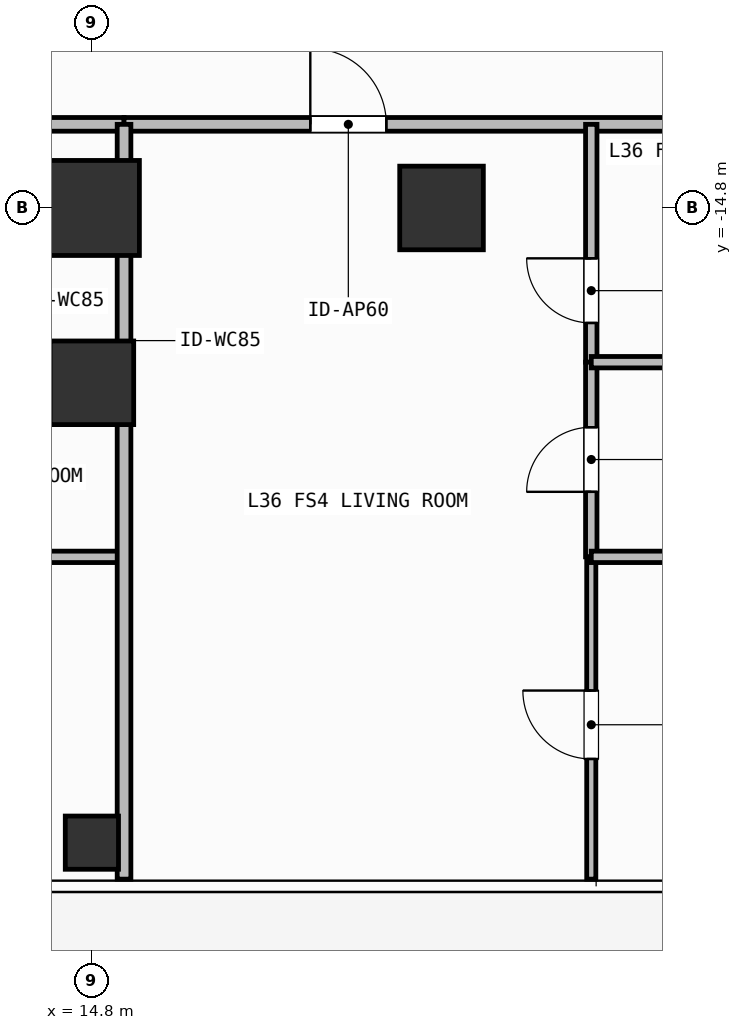
"""IFC4 building model, lengths in metres.
Left out: names, types, materials, properties, quantities, classifications, styles, units other than length and angle.
Written with IfcOpenShell. Run it as: python <this file> out.ifc"""

import sys

from ifc_helpers import new_model, si_unit, direction, frame, frame_2d, origin, origin_2d, place, context, subcontext, project, spatial, rectangle, hollow_rectangle, extrude, element, fill, save


model = new_model("IFC4")
c1 = context("Model", 3, precision=1e-05, world=origin(), true_north=direction((0.0, 1.0)))
c2 = subcontext(c1, "Body", "Model", "MODEL_VIEW")
j1 = project(units=[si_unit("LENGTHUNIT", "METRE"), si_unit("PLANEANGLEUNIT", "RADIAN")], contexts=[c1])
p1 = place(None, origin())
s1 = spatial("IfcSite", under=j1, at=p1, CompositionType="ELEMENT")
p2 = place(p1, origin())
s2 = spatial("IfcBuilding", under=s1, at=p2, CompositionType="ELEMENT")
p3 = place(p2, frame((0.0, 0.0, 144.6)))
s3 = spatial("IfcBuildingStorey", under=s2, at=p3, CompositionType="ELEMENT", Elevation=144.6)
p4 = place(p3, frame((14.8, -14.8, 0.0), z_axis=(0.0, 0.0, 1.0), x_axis=(1.0, 0.0, 0.0)))
e1 = element("IfcColumn", 1, at=p4, inside=s3, PredefinedType="COLUMN", context=c2, shape_type="SweptSolid", body=[
    extrude(rectangle(XDim=1.25, YDim=1.25, at=origin_2d()), origin(), (0.0, 0.0, 1.0), 3.9),
])
for number, where, z_axis, x_axis in (
    (2, (19.4, -14.8, 0.0), (0.0, 0.0, 1.0), (1.0, 0.0, 0.0)),
    (3, (14.8, -17.1, 0.0), (0.0, 0.0, 1.0), (1.0, 0.0, 0.0)),
):
    element("IfcColumn", number, at=place(p3, frame(where, z_axis=z_axis, x_axis=x_axis)), inside=s3, PredefinedType="COLUMN", context=c2, shape_type="SweptSolid", body=[
        extrude(rectangle(XDim=1.1, YDim=1.1, at=origin_2d()), origin(), (0.0, 0.0, 1.0), 3.9),
    ])
p5 = place(p3, frame((14.8, -23.15, 0.0), z_axis=(0.0, 0.0, 1.0), x_axis=(1.0, 0.0, 0.0)))
e4 = element("IfcColumn", 4, at=p5, inside=s3, PredefinedType="COLUMN", context=c2, shape_type="SweptSolid", body=[
    extrude(hollow_rectangle(XDim=0.7, YDim=0.7, WallThickness=0.032, at=origin_2d()), origin(), (0.0, 0.0, 1.0), 3.9),
])
p6 = place(p3, frame((3.9, -13.7, 0.0), z_axis=(0.0, 0.0, 1.0), x_axis=(1.0, 0.0, 0.0)))
e5 = element("IfcWall", 5, at=p6, inside=s3, PredefinedType="PARTITIONING", context=c2, shape_type="SweptSolid", body=[
    extrude(rectangle(XDim=11.323, YDim=0.18, at=frame_2d((5.662, 0.0))), origin(), (0.0, 0.0, 1.0), 3.68),
])
p7 = place(p6, frame((5.519, 0.0, 0.0)))
e6 = element("IfcOpeningElement", 6, at=p7, cuts=e5, PredefinedType="OPENING", context=c2, shape_type="SweptSolid", body=[
    extrude(rectangle(XDim=1.0, YDim=2.2, at=frame_2d((0.5, 1.1))), frame((0.0, 0.1, 0.0), z_axis=(0.0, -1.0, 0.0), x_axis=(1.0, 0.0, 0.0)), (0.0, 0.0, 1.0), 0.2),
])
p8 = place(p3, frame((15.223, -13.7, 0.0), z_axis=(0.0, 0.0, 1.0), x_axis=(1.0, 0.0, 0.0)))
e7 = element("IfcWall", 7, at=p8, inside=s3, PredefinedType="PARTITIONING", context=c2, shape_type="SweptSolid", body=[
    extrude(rectangle(XDim=8.897, YDim=0.18, at=frame_2d((4.449, 0.0))), origin(), (0.0, 0.0, 1.0), 3.68),
])
p9 = place(p8, frame((2.451, 0.0, 0.0)))
e8 = element("IfcOpeningElement", 8, at=p9, cuts=e7, PredefinedType="OPENING", context=c2, shape_type="SweptSolid", body=[
    extrude(rectangle(XDim=1.0, YDim=2.2, at=frame_2d((0.5, 1.1))), frame((0.0, 0.1, 0.0), z_axis=(0.0, -1.0, 0.0), x_axis=(1.0, 0.0, 0.0)), (0.0, 0.0, 1.0), 0.2),
])
p10 = place(p3, frame((21.37, -16.829, 0.0), z_axis=(0.0, 0.0, 1.0), x_axis=(0.0, 1.0, 0.0)))
e9 = element("IfcWall", 9, at=p10, inside=s3, PredefinedType="PARTITIONING", context=c2, shape_type="SweptSolid", body=[
    extrude(rectangle(XDim=3.129, YDim=0.15, at=frame_2d((1.564, 0.0))), origin(), (0.0, 0.0, 1.0), 3.68),
])
p11 = place(p10, frame((0.516, 0.0, 0.0)))
e10 = element("IfcOpeningElement", 10, at=p11, cuts=e9, PredefinedType="OPENING", context=c2, shape_type="SweptSolid", body=[
    extrude(rectangle(XDim=0.85, YDim=2.1, at=frame_2d((0.425, 1.05))), frame((0.0, 0.085, 0.0), z_axis=(0.0, -1.0, 0.0), x_axis=(1.0, 0.0, 0.0)), (0.0, 0.0, 1.0), 0.17),
])
p12 = place(p3, frame((21.37, -19.39, 0.0), z_axis=(0.0, 0.0, 1.0), x_axis=(0.0, 1.0, 0.0)))
e11 = element("IfcWall", 11, at=p12, inside=s3, PredefinedType="PARTITIONING", context=c2, shape_type="SweptSolid", body=[
    extrude(rectangle(XDim=2.561, YDim=0.15, at=frame_2d((1.28, 0.0))), origin(), (0.0, 0.0, 1.0), 3.68),
])
p13 = place(p12, frame((0.855, 0.0, 0.0)))
e12 = element("IfcOpeningElement", 12, at=p13, cuts=e11, PredefinedType="OPENING", context=c2, shape_type="SweptSolid", body=[
    extrude(rectangle(XDim=0.85, YDim=2.1, at=frame_2d((0.425, 1.05))), frame((0.0, 0.085, 0.0), z_axis=(0.0, -1.0, 0.0), x_axis=(1.0, 0.0, 0.0)), (0.0, 0.0, 1.0), 0.17),
])
p14 = place(p3, frame((21.37, -23.63, 0.0), z_axis=(0.0, 0.0, 1.0), x_axis=(0.0, 1.0, 0.0)))
e13 = element("IfcWall", 13, at=p14, inside=s3, PredefinedType="PARTITIONING", context=c2, shape_type="SweptSolid", body=[
    extrude(rectangle(XDim=4.24, YDim=0.12, at=frame_2d((2.12, 0.0))), origin(), (0.0, 0.0, 1.0), 3.68),
])
p15 = place(p14, frame((1.581, 0.0, 0.0)))
e14 = element("IfcOpeningElement", 14, at=p15, cuts=e13, PredefinedType="OPENING", context=c2, shape_type="SweptSolid", body=[
    extrude(rectangle(XDim=0.9, YDim=2.1, at=frame_2d((0.45, 1.05))), frame((0.0, 0.07, 0.0), z_axis=(0.0, -1.0, 0.0), x_axis=(1.0, 0.0, 0.0)), (0.0, 0.0, 1.0), 0.14),
])
p16 = place(p3, frame((11.69, -19.39, 0.0), z_axis=(0.0, 0.0, 1.0), x_axis=(1.0, 0.0, 0.0)))
e15 = element("IfcWall", 15, at=p16, inside=s3, PredefinedType="PARTITIONING", context=c2, shape_type="SweptSolid", body=[
    extrude(rectangle(XDim=3.533, YDim=0.15, at=frame_2d((1.767, 0.0))), origin(), (0.0, 0.0, 1.0), 3.68),
])
for number, where, z_axis, x_axis in (
    (16, (21.37, -16.829, 0.0), (0.0, 0.0, 1.0), (1.0, 0.0, 0.0)),
    (17, (21.37, -19.39, 0.0), (0.0, 0.0, 1.0), (1.0, 0.0, 0.0)),
):
    element("IfcWall", number, at=place(p3, frame(where, z_axis=z_axis, x_axis=x_axis)), inside=s3, PredefinedType="PARTITIONING", context=c2, shape_type="SweptSolid", body=[
        extrude(rectangle(XDim=2.75, YDim=0.15, at=frame_2d((1.375, 0.0))), origin(), (0.0, 0.0, 1.0), 3.68),
    ])
p17 = place(p3, frame((15.223, -23.63, 0.0), z_axis=(0.0, 0.0, 1.0), x_axis=(0.0, 1.0, 0.0)))
e18 = element("IfcWall", 18, at=p17, inside=s3, PredefinedType="PARTITIONING", context=c2, shape_type="SweptSolid", body=[
    extrude(rectangle(XDim=9.93, YDim=0.18, at=frame_2d((4.965, 0.0))), origin(), (0.0, 0.0, 1.0), 3.68),
])
p18 = place(p9, origin())
e19 = element("IfcDoor", 19, at=p18, inside=s3, OperationType="SINGLE_SWING_LEFT", PredefinedType="DOOR", context=c2, shape_type="SweptSolid", body=[
    extrude(rectangle(XDim=1.0, YDim=2.2, at=frame_2d((0.5, 1.1))), frame((0.0, 0.025, 0.0), z_axis=(0.0, -1.0, 0.0), x_axis=(1.0, 0.0, 0.0)), (0.0, 0.0, 1.0), 0.05),
])
fill(e8, e19)
p19 = place(p11, origin())
e20 = element("IfcDoor", 20, at=p19, inside=s3, OperationType="SINGLE_SWING_RIGHT", PredefinedType="DOOR", context=c2, shape_type="SweptSolid", body=[
    extrude(rectangle(XDim=0.85, YDim=2.1, at=frame_2d((0.425, 1.05))), frame((0.0, 0.025, 0.0), z_axis=(0.0, -1.0, 0.0), x_axis=(1.0, 0.0, 0.0)), (0.0, 0.0, 1.0), 0.05),
])
fill(e10, e20)
p20 = place(p13, origin())
e21 = element("IfcDoor", 21, at=p20, inside=s3, OperationType="SINGLE_SWING_LEFT", PredefinedType="DOOR", context=c2, shape_type="SweptSolid", body=[
    extrude(rectangle(XDim=0.85, YDim=2.1, at=frame_2d((0.425, 1.05))), frame((0.0, 0.025, 0.0), z_axis=(0.0, -1.0, 0.0), x_axis=(1.0, 0.0, 0.0)), (0.0, 0.0, 1.0), 0.05),
])
fill(e12, e21)
p21 = place(p15, origin())
e22 = element("IfcDoor", 22, at=p21, inside=s3, OperationType="SINGLE_SWING_RIGHT", PredefinedType="DOOR", context=c2, shape_type="SweptSolid", body=[
    extrude(rectangle(XDim=0.9, YDim=2.1, at=frame_2d((0.45, 1.05))), frame((0.0, 0.025, 0.0), z_axis=(0.0, -1.0, 0.0), x_axis=(1.0, 0.0, 0.0)), (0.0, 0.0, 1.0), 0.05),
])
fill(e14, e22)
save(model, sys.argv[1])
